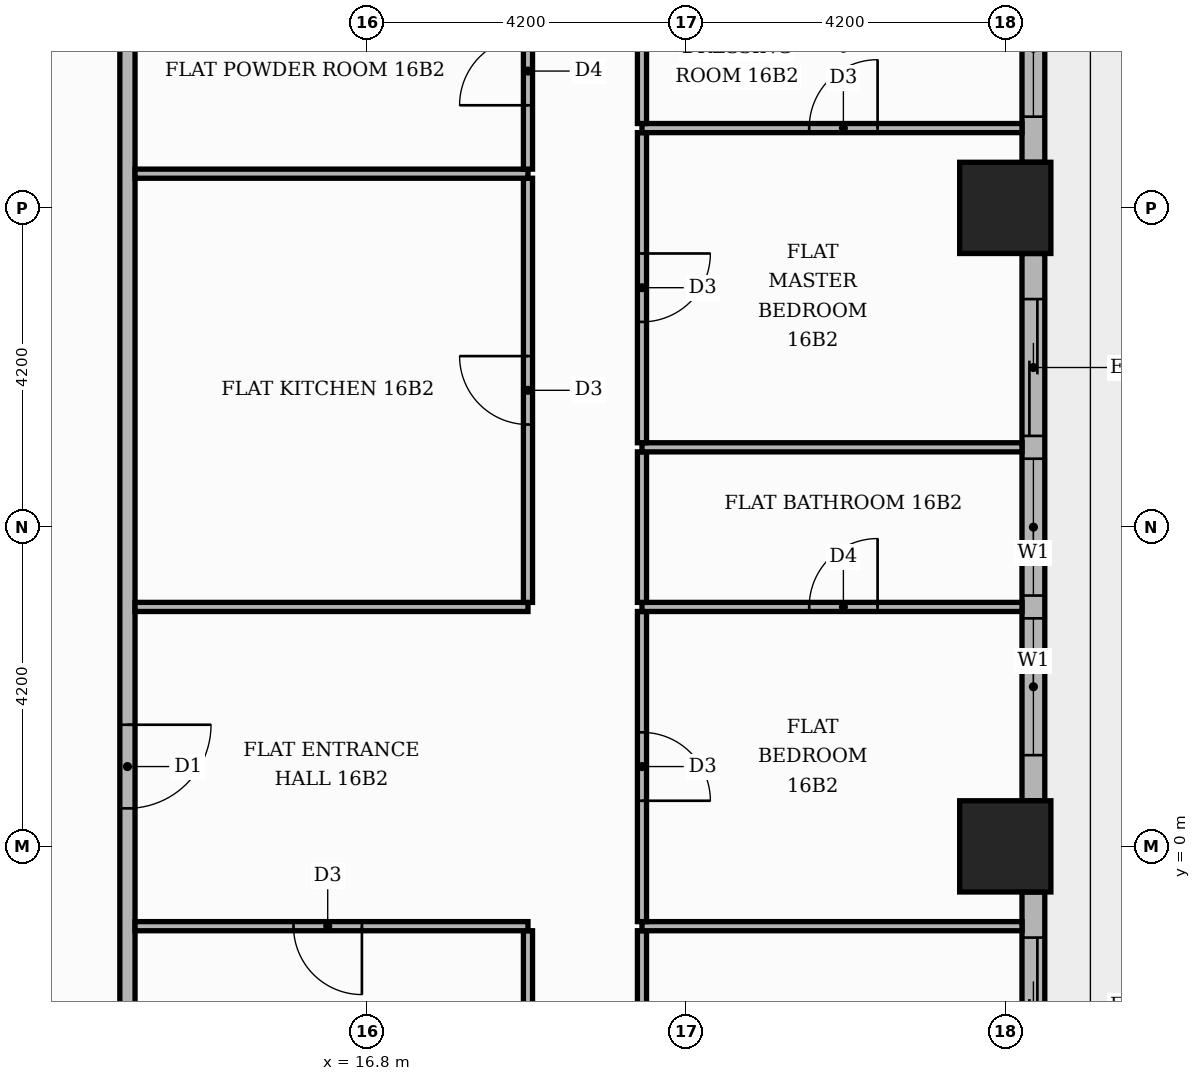
"""IFC4 building model, lengths in metres.
Left out: names, types, materials, properties, quantities, classifications, styles, units other than length and angle.
Written with IfcOpenShell. Run it as: python <this file> out.ifc"""

import sys

from ifc_helpers import new_model, si_unit, direction, frame, frame_2d, origin, origin_2d, place, context, subcontext, project, spatial, rectangle, extrude, element, fill, save


model = new_model("IFC4")
c1 = context("Model", 3, precision=1e-05, world=origin(), true_north=direction((0.0, 1.0)))
c2 = subcontext(c1, "Body", "Model", "MODEL_VIEW")
j1 = project(units=[si_unit("LENGTHUNIT", "METRE"), si_unit("PLANEANGLEUNIT", "RADIAN")], contexts=[c1])
p1 = place(None, origin())
s1 = spatial("IfcSite", under=j1, at=p1, CompositionType="ELEMENT")
p2 = place(p1, origin())
s2 = spatial("IfcBuilding", under=s1, at=p2, CompositionType="ELEMENT")
p3 = place(p2, frame((0.0, 0.0, 69.9)))
s3 = spatial("IfcBuildingStorey", under=s2, at=p3, CompositionType="ELEMENT", Elevation=69.9)
for number, where, z_axis, x_axis in (
    (1, (25.2, 0.0, 0.0), (0.0, 0.0, 1.0), (1.0, 0.0, 0.0)),
    (2, (25.2, 8.4, 0.0), (0.0, 0.0, 1.0), (1.0, 0.0, 0.0)),
):
    element("IfcColumn", number, at=place(p3, frame(where, z_axis=z_axis, x_axis=x_axis)), inside=s3, PredefinedType="COLUMN", context=c2, shape_type="SweptSolid", body=[
        extrude(rectangle(XDim=1.2, YDim=1.2, at=origin_2d()), origin(), (0.0, 0.0, 1.0), 3.9),
    ])
p4 = place(p3, frame((25.57, -7.8, 0.0), z_axis=(0.0, 0.0, 1.0), x_axis=(0.0, 1.0, 0.0)))
e3 = element("IfcWall", 3, at=p4, inside=s3, PredefinedType="STANDARD", context=c2, shape_type="SweptSolid", body=[
    extrude(rectangle(XDim=7.2, YDim=0.3, at=frame_2d((3.6, 0.0))), origin(), (0.0, 0.0, 1.0), 3.4),
])
p5 = place(p4, frame((0.6, 0.0, 0.9)))
e4 = element("IfcOpeningElement", 4, at=p5, cuts=e3, PredefinedType="OPENING", context=c2, shape_type="SweptSolid", body=[
    extrude(rectangle(XDim=1.8, YDim=2.1, at=frame_2d((0.9, 1.05))), frame((0.0, 0.16, 0.0), z_axis=(0.0, -1.0, 0.0), x_axis=(1.0, 0.0, 0.0)), (0.0, 0.0, 1.0), 0.32),
])
p6 = place(p4, frame((2.7, 0.0, 0.9)))
e5 = element("IfcOpeningElement", 5, at=p6, cuts=e3, PredefinedType="OPENING", context=c2, shape_type="SweptSolid", body=[
    extrude(rectangle(XDim=1.8, YDim=2.1, at=frame_2d((0.9, 1.05))), frame((0.0, 0.16, 0.0), z_axis=(0.0, -1.0, 0.0), x_axis=(1.0, 0.0, 0.0)), (0.0, 0.0, 1.0), 0.32),
])
p7 = place(p4, frame((4.8, 0.0, 0.0)))
e6 = element("IfcOpeningElement", 6, at=p7, cuts=e3, PredefinedType="OPENING", context=c2, shape_type="SweptSolid", body=[
    extrude(rectangle(XDim=1.8, YDim=2.4, at=frame_2d((0.9, 1.2))), frame((0.0, 0.16, 0.0), z_axis=(0.0, -1.0, 0.0), x_axis=(1.0, 0.0, 0.0)), (0.0, 0.0, 1.0), 0.32),
])
p8 = place(p3, frame((25.57, 0.6, 0.0), z_axis=(0.0, 0.0, 1.0), x_axis=(0.0, 1.0, 0.0)))
e7 = element("IfcWall", 7, at=p8, inside=s3, PredefinedType="STANDARD", context=c2, shape_type="SweptSolid", body=[
    extrude(rectangle(XDim=7.2, YDim=0.3, at=frame_2d((3.6, 0.0))), origin(), (0.0, 0.0, 1.0), 3.4),
])
p9 = place(p8, frame((0.6, 0.0, 0.9)))
e8 = element("IfcOpeningElement", 8, at=p9, cuts=e7, PredefinedType="OPENING", context=c2, shape_type="SweptSolid", body=[
    extrude(rectangle(XDim=1.8, YDim=2.1, at=frame_2d((0.9, 1.05))), frame((0.0, 0.16, 0.0), z_axis=(0.0, -1.0, 0.0), x_axis=(1.0, 0.0, 0.0)), (0.0, 0.0, 1.0), 0.32),
])
p10 = place(p8, frame((2.7, 0.0, 0.9)))
e9 = element("IfcOpeningElement", 9, at=p10, cuts=e7, PredefinedType="OPENING", context=c2, shape_type="SweptSolid", body=[
    extrude(rectangle(XDim=1.8, YDim=2.1, at=frame_2d((0.9, 1.05))), frame((0.0, 0.16, 0.0), z_axis=(0.0, -1.0, 0.0), x_axis=(1.0, 0.0, 0.0)), (0.0, 0.0, 1.0), 0.32),
])
p11 = place(p8, frame((4.8, 0.0, 0.0)))
e10 = element("IfcOpeningElement", 10, at=p11, cuts=e7, PredefinedType="OPENING", context=c2, shape_type="SweptSolid", body=[
    extrude(rectangle(XDim=1.8, YDim=2.4, at=frame_2d((0.9, 1.2))), frame((0.0, 0.16, 0.0), z_axis=(0.0, -1.0, 0.0), x_axis=(1.0, 0.0, 0.0)), (0.0, 0.0, 1.0), 0.32),
])
p12 = place(p3, frame((25.57, 9.0, 0.0), z_axis=(0.0, 0.0, 1.0), x_axis=(0.0, 1.0, 0.0)))
e11 = element("IfcWall", 11, at=p12, inside=s3, PredefinedType="STANDARD", context=c2, shape_type="SweptSolid", body=[
    extrude(rectangle(XDim=7.2, YDim=0.3, at=frame_2d((3.6, 0.0))), origin(), (0.0, 0.0, 1.0), 3.4),
])
p13 = place(p12, frame((0.6, 0.0, 0.9)))
e12 = element("IfcOpeningElement", 12, at=p13, cuts=e11, PredefinedType="OPENING", context=c2, shape_type="SweptSolid", body=[
    extrude(rectangle(XDim=1.8, YDim=2.1, at=frame_2d((0.9, 1.05))), frame((0.0, 0.16, 0.0), z_axis=(0.0, -1.0, 0.0), x_axis=(1.0, 0.0, 0.0)), (0.0, 0.0, 1.0), 0.32),
])
p14 = place(p12, frame((2.7, 0.0, 0.9)))
e13 = element("IfcOpeningElement", 13, at=p14, cuts=e11, PredefinedType="OPENING", context=c2, shape_type="SweptSolid", body=[
    extrude(rectangle(XDim=1.8, YDim=2.1, at=frame_2d((0.9, 1.05))), frame((0.0, 0.16, 0.0), z_axis=(0.0, -1.0, 0.0), x_axis=(1.0, 0.0, 0.0)), (0.0, 0.0, 1.0), 0.32),
])
p15 = place(p12, frame((4.8, 0.0, 0.9)))
e14 = element("IfcOpeningElement", 14, at=p15, cuts=e11, PredefinedType="OPENING", context=c2, shape_type="SweptSolid", body=[
    extrude(rectangle(XDim=1.8, YDim=2.1, at=frame_2d((0.9, 1.05))), frame((0.0, 0.16, 0.0), z_axis=(0.0, -1.0, 0.0), x_axis=(1.0, 0.0, 0.0)), (0.0, 0.0, 1.0), 0.32),
])
p16 = place(p3, frame((13.65, -5.15, 0.0), z_axis=(0.0, 0.0, 1.0), x_axis=(0.0, 1.0, 0.0)))
e15 = element("IfcWall", 15, at=p16, inside=s3, PredefinedType="PARTITIONING", context=c2, shape_type="SweptSolid", body=[
    extrude(rectangle(XDim=18.7, YDim=0.2, at=frame_2d((9.35, 0.0))), origin(), (0.0, 0.0, 1.0), 3.4),
])
p17 = place(p16, frame((5.65, 0.0, 0.0)))
e16 = element("IfcOpeningElement", 16, at=p17, cuts=e15, PredefinedType="OPENING", context=c2, shape_type="SweptSolid", body=[
    extrude(rectangle(XDim=1.1, YDim=2.4, at=frame_2d((0.55, 1.2))), frame((0.0, 0.11, 0.0), z_axis=(0.0, -1.0, 0.0), x_axis=(1.0, 0.0, 0.0)), (0.0, 0.0, 1.0), 0.22),
])
p18 = place(p3, frame((18.92, -5.15, 0.0), z_axis=(0.0, 0.0, 1.0), x_axis=(0.0, 1.0, 0.0)))
e17 = element("IfcWall", 17, at=p18, inside=s3, PredefinedType="PARTITIONING", context=c2, shape_type="SweptSolid", body=[
    extrude(rectangle(XDim=4.04, YDim=0.12, at=frame_2d((2.02, 0.0))), origin(), (0.0, 0.0, 1.0), 3.4),
])
p19 = place(p3, frame((20.42, -5.15, 0.0), z_axis=(0.0, 0.0, 1.0), x_axis=(0.0, 1.0, 0.0)))
e18 = element("IfcWall", 18, at=p19, inside=s3, PredefinedType="PARTITIONING", context=c2, shape_type="SweptSolid", body=[
    extrude(rectangle(XDim=4.04, YDim=0.12, at=frame_2d((2.02, 0.0))), origin(), (0.0, 0.0, 1.0), 3.4),
])
p20 = place(p19, frame((1.5, 0.0, 0.0)))
e19 = element("IfcOpeningElement", 19, at=p20, cuts=e18, PredefinedType="OPENING", context=c2, shape_type="SweptSolid", body=[
    extrude(rectangle(XDim=1.0, YDim=2.1, at=frame_2d((0.5, 1.05))), frame((0.0, 0.07, 0.0), z_axis=(0.0, -1.0, 0.0), x_axis=(1.0, 0.0, 0.0)), (0.0, 0.0, 1.0), 0.14),
])
p21 = place(p3, frame((13.75, -1.05, 0.0), z_axis=(0.0, 0.0, 1.0), x_axis=(1.0, 0.0, 0.0)))
e20 = element("IfcWall", 20, at=p21, inside=s3, PredefinedType="PARTITIONING", context=c2, shape_type="SweptSolid", body=[
    extrude(rectangle(XDim=5.17, YDim=0.12, at=frame_2d((2.585, 0.0))), origin(), (0.0, 0.0, 1.0), 3.4),
])
p22 = place(p21, frame((2.085, 0.0, 0.0)))
e21 = element("IfcOpeningElement", 21, at=p22, cuts=e20, PredefinedType="OPENING", context=c2, shape_type="SweptSolid", body=[
    extrude(rectangle(XDim=0.9, YDim=2.1, at=frame_2d((0.45, 1.05))), frame((0.0, 0.07, 0.0), z_axis=(0.0, -1.0, 0.0), x_axis=(1.0, 0.0, 0.0)), (0.0, 0.0, 1.0), 0.14),
])
p23 = place(p3, frame((20.42, -1.05, 0.0), z_axis=(0.0, 0.0, 1.0), x_axis=(1.0, 0.0, 0.0)))
e22 = element("IfcWall", 22, at=p23, inside=s3, PredefinedType="PARTITIONING", context=c2, shape_type="SweptSolid", body=[
    extrude(rectangle(XDim=5.0, YDim=0.12, at=frame_2d((2.5, 0.0))), origin(), (0.0, 0.0, 1.0), 3.4),
])
p24 = place(p3, frame((20.42, -0.99, 0.0), z_axis=(0.0, 0.0, 1.0), x_axis=(0.0, 1.0, 0.0)))
e23 = element("IfcWall", 23, at=p24, inside=s3, PredefinedType="PARTITIONING", context=c2, shape_type="SweptSolid", body=[
    extrude(rectangle(XDim=4.08, YDim=0.12, at=frame_2d((2.04, 0.0))), origin(), (0.0, 0.0, 1.0), 3.4),
])
p25 = place(p24, frame((1.59, 0.0, 0.0)))
e24 = element("IfcOpeningElement", 24, at=p25, cuts=e23, PredefinedType="OPENING", context=c2, shape_type="SweptSolid", body=[
    extrude(rectangle(XDim=0.9, YDim=2.1, at=frame_2d((0.45, 1.05))), frame((0.0, 0.07, 0.0), z_axis=(0.0, -1.0, 0.0), x_axis=(1.0, 0.0, 0.0)), (0.0, 0.0, 1.0), 0.14),
])
p26 = place(p3, frame((13.75, 3.15, 0.0), z_axis=(0.0, 0.0, 1.0), x_axis=(1.0, 0.0, 0.0)))
e25 = element("IfcWall", 25, at=p26, inside=s3, PredefinedType="PARTITIONING", context=c2, shape_type="SweptSolid", body=[
    extrude(rectangle(XDim=5.17, YDim=0.12, at=frame_2d((2.585, 0.0))), origin(), (0.0, 0.0, 1.0), 3.4),
])
p27 = place(p3, frame((20.42, 3.15, 0.0), z_axis=(0.0, 0.0, 1.0), x_axis=(1.0, 0.0, 0.0)))
e26 = element("IfcWall", 26, at=p27, inside=s3, PredefinedType="PARTITIONING", context=c2, shape_type="SweptSolid", body=[
    extrude(rectangle(XDim=5.0, YDim=0.12, at=frame_2d((2.5, 0.0))), origin(), (0.0, 0.0, 1.0), 3.4),
])
p28 = place(p27, frame((2.2, 0.0, 0.0)))
e27 = element("IfcOpeningElement", 27, at=p28, cuts=e26, PredefinedType="OPENING", context=c2, shape_type="SweptSolid", body=[
    extrude(rectangle(XDim=0.9, YDim=2.1, at=frame_2d((0.45, 1.05))), frame((0.0, 0.07, 0.0), z_axis=(0.0, -1.0, 0.0), x_axis=(1.0, 0.0, 0.0)), (0.0, 0.0, 1.0), 0.14),
])
p29 = place(p3, frame((18.92, 3.21, 0.0), z_axis=(0.0, 0.0, 1.0), x_axis=(0.0, 1.0, 0.0)))
e28 = element("IfcWall", 28, at=p29, inside=s3, PredefinedType="PARTITIONING", context=c2, shape_type="SweptSolid", body=[
    extrude(rectangle(XDim=5.58, YDim=0.12, at=frame_2d((2.79, 0.0))), origin(), (0.0, 0.0, 1.0), 3.4),
])
p30 = place(p29, frame((2.34, 0.0, 0.0)))
e29 = element("IfcOpeningElement", 29, at=p30, cuts=e28, PredefinedType="OPENING", context=c2, shape_type="SweptSolid", body=[
    extrude(rectangle(XDim=0.9, YDim=2.1, at=frame_2d((0.45, 1.05))), frame((0.0, 0.07, 0.0), z_axis=(0.0, -1.0, 0.0), x_axis=(1.0, 0.0, 0.0)), (0.0, 0.0, 1.0), 0.14),
])
p31 = place(p3, frame((20.42, 3.21, 0.0), z_axis=(0.0, 0.0, 1.0), x_axis=(0.0, 1.0, 0.0)))
e30 = element("IfcWall", 30, at=p31, inside=s3, PredefinedType="PARTITIONING", context=c2, shape_type="SweptSolid", body=[
    extrude(rectangle(XDim=1.98, YDim=0.12, at=frame_2d((0.99, 0.0))), origin(), (0.0, 0.0, 1.0), 3.4),
])
p32 = place(p3, frame((20.42, 5.25, 0.0), z_axis=(0.0, 0.0, 1.0), x_axis=(1.0, 0.0, 0.0)))
e31 = element("IfcWall", 31, at=p32, inside=s3, PredefinedType="PARTITIONING", context=c2, shape_type="SweptSolid", body=[
    extrude(rectangle(XDim=5.0, YDim=0.12, at=frame_2d((2.5, 0.0))), origin(), (0.0, 0.0, 1.0), 3.4),
])
p33 = place(p3, frame((20.42, 5.31, 0.0), z_axis=(0.0, 0.0, 1.0), x_axis=(0.0, 1.0, 0.0)))
e32 = element("IfcWall", 32, at=p33, inside=s3, PredefinedType="PARTITIONING", context=c2, shape_type="SweptSolid", body=[
    extrude(rectangle(XDim=4.08, YDim=0.12, at=frame_2d((2.04, 0.0))), origin(), (0.0, 0.0, 1.0), 3.4),
])
p34 = place(p33, frame((1.59, 0.0, 0.0)))
e33 = element("IfcOpeningElement", 33, at=p34, cuts=e32, PredefinedType="OPENING", context=c2, shape_type="SweptSolid", body=[
    extrude(rectangle(XDim=0.9, YDim=2.1, at=frame_2d((0.45, 1.05))), frame((0.0, 0.07, 0.0), z_axis=(0.0, -1.0, 0.0), x_axis=(1.0, 0.0, 0.0)), (0.0, 0.0, 1.0), 0.14),
])
p35 = place(p3, frame((13.75, 8.85, 0.0), z_axis=(0.0, 0.0, 1.0), x_axis=(1.0, 0.0, 0.0)))
e34 = element("IfcWall", 34, at=p35, inside=s3, PredefinedType="PARTITIONING", context=c2, shape_type="SweptSolid", body=[
    extrude(rectangle(XDim=5.17, YDim=0.12, at=frame_2d((2.585, 0.0))), origin(), (0.0, 0.0, 1.0), 3.4),
])
p36 = place(p3, frame((18.92, 8.91, 0.0), z_axis=(0.0, 0.0, 1.0), x_axis=(0.0, 1.0, 0.0)))
e35 = element("IfcWall", 35, at=p36, inside=s3, PredefinedType="PARTITIONING", context=c2, shape_type="SweptSolid", body=[
    extrude(rectangle(XDim=2.58, YDim=0.12, at=frame_2d((1.29, 0.0))), origin(), (0.0, 0.0, 1.0), 3.4),
])
p37 = place(p36, frame((0.84, 0.0, 0.0)))
e36 = element("IfcOpeningElement", 36, at=p37, cuts=e35, PredefinedType="OPENING", context=c2, shape_type="SweptSolid", body=[
    extrude(rectangle(XDim=0.9, YDim=2.1, at=frame_2d((0.45, 1.05))), frame((0.0, 0.07, 0.0), z_axis=(0.0, -1.0, 0.0), x_axis=(1.0, 0.0, 0.0)), (0.0, 0.0, 1.0), 0.14),
])
p38 = place(p3, frame((20.42, 9.45, 0.0), z_axis=(0.0, 0.0, 1.0), x_axis=(1.0, 0.0, 0.0)))
e37 = element("IfcWall", 37, at=p38, inside=s3, PredefinedType="PARTITIONING", context=c2, shape_type="SweptSolid", body=[
    extrude(rectangle(XDim=5.0, YDim=0.12, at=frame_2d((2.5, 0.0))), origin(), (0.0, 0.0, 1.0), 3.4),
])
p39 = place(p38, frame((2.2, 0.0, 0.0)))
e38 = element("IfcOpeningElement", 38, at=p39, cuts=e37, PredefinedType="OPENING", context=c2, shape_type="SweptSolid", body=[
    extrude(rectangle(XDim=0.9, YDim=2.1, at=frame_2d((0.45, 1.05))), frame((0.0, 0.07, 0.0), z_axis=(0.0, -1.0, 0.0), x_axis=(1.0, 0.0, 0.0)), (0.0, 0.0, 1.0), 0.14),
])
p40 = place(p3, frame((20.42, 9.51, 0.0), z_axis=(0.0, 0.0, 1.0), x_axis=(0.0, 1.0, 0.0)))
e39 = element("IfcWall", 39, at=p40, inside=s3, PredefinedType="PARTITIONING", context=c2, shape_type="SweptSolid", body=[
    extrude(rectangle(XDim=1.98, YDim=0.12, at=frame_2d((0.99, 0.0))), origin(), (0.0, 0.0, 1.0), 3.4),
])
p41 = place(p7, origin())
e40 = element("IfcDoor", 40, at=p41, inside=s3, OperationType="SLIDING_TO_RIGHT", PredefinedType="DOOR", context=c2, shape_type="SweptSolid", body=[
    extrude(rectangle(XDim=1.8, YDim=2.4, at=frame_2d((0.9, 1.2))), frame((0.0, 0.025, 0.0), z_axis=(0.0, -1.0, 0.0), x_axis=(1.0, 0.0, 0.0)), (0.0, 0.0, 1.0), 0.05),
])
fill(e6, e40)
p42 = place(p9, origin())
e41 = element("IfcWindow", 41, at=p42, inside=s3, PartitioningType="SINGLE_PANEL", PredefinedType="WINDOW", context=c2, shape_type="SweptSolid", body=[
    extrude(rectangle(XDim=1.8, YDim=2.1, at=frame_2d((0.9, 1.05))), frame((0.0, 0.03, 0.0), z_axis=(0.0, -1.0, 0.0), x_axis=(1.0, 0.0, 0.0)), (0.0, 0.0, 1.0), 0.06),
])
fill(e8, e41)
p43 = place(p10, origin())
e42 = element("IfcWindow", 42, at=p43, inside=s3, PartitioningType="SINGLE_PANEL", PredefinedType="WINDOW", context=c2, shape_type="SweptSolid", body=[
    extrude(rectangle(XDim=1.8, YDim=2.1, at=frame_2d((0.9, 1.05))), frame((0.0, 0.03, 0.0), z_axis=(0.0, -1.0, 0.0), x_axis=(1.0, 0.0, 0.0)), (0.0, 0.0, 1.0), 0.06),
])
fill(e9, e42)
p44 = place(p11, origin())
e43 = element("IfcDoor", 43, at=p44, inside=s3, OperationType="SLIDING_TO_RIGHT", PredefinedType="DOOR", context=c2, shape_type="SweptSolid", body=[
    extrude(rectangle(XDim=1.8, YDim=2.4, at=frame_2d((0.9, 1.2))), frame((0.0, 0.025, 0.0), z_axis=(0.0, -1.0, 0.0), x_axis=(1.0, 0.0, 0.0)), (0.0, 0.0, 1.0), 0.05),
])
fill(e10, e43)
p45 = place(p13, origin())
e44 = element("IfcWindow", 44, at=p45, inside=s3, PartitioningType="SINGLE_PANEL", PredefinedType="WINDOW", context=c2, shape_type="SweptSolid", body=[
    extrude(rectangle(XDim=1.8, YDim=2.1, at=frame_2d((0.9, 1.05))), frame((0.0, 0.03, 0.0), z_axis=(0.0, -1.0, 0.0), x_axis=(1.0, 0.0, 0.0)), (0.0, 0.0, 1.0), 0.06),
])
fill(e12, e44)
p46 = place(p17, frame((1.1, 0.0, 0.0), z_axis=(0.0, 0.0, 1.0), x_axis=(-1.0, 0.0, 0.0)))
e45 = element("IfcDoor", 45, at=p46, inside=s3, OperationType="SINGLE_SWING_RIGHT", PredefinedType="DOOR", context=c2, shape_type="SweptSolid", body=[
    extrude(rectangle(XDim=1.1, YDim=2.4, at=frame_2d((0.55, 1.2))), frame((0.0, 0.025, 0.0), z_axis=(0.0, -1.0, 0.0), x_axis=(1.0, 0.0, 0.0)), (0.0, 0.0, 1.0), 0.05),
])
fill(e16, e45)
p47 = place(p22, frame((0.9, 0.0, 0.0), z_axis=(0.0, 0.0, 1.0), x_axis=(-1.0, 0.0, 0.0)))
e46 = element("IfcDoor", 46, at=p47, inside=s3, OperationType="SINGLE_SWING_RIGHT", PredefinedType="DOOR", context=c2, shape_type="SweptSolid", body=[
    extrude(rectangle(XDim=0.9, YDim=2.1, at=frame_2d((0.45, 1.05))), frame((0.0, 0.025, 0.0), z_axis=(0.0, -1.0, 0.0), x_axis=(1.0, 0.0, 0.0)), (0.0, 0.0, 1.0), 0.05),
])
fill(e21, e46)
p48 = place(p30, origin())
e47 = element("IfcDoor", 47, at=p48, inside=s3, OperationType="SINGLE_SWING_RIGHT", PredefinedType="DOOR", context=c2, shape_type="SweptSolid", body=[
    extrude(rectangle(XDim=0.9, YDim=2.1, at=frame_2d((0.45, 1.05))), frame((0.0, 0.025, 0.0), z_axis=(0.0, -1.0, 0.0), x_axis=(1.0, 0.0, 0.0)), (0.0, 0.0, 1.0), 0.05),
])
fill(e29, e47)
p49 = place(p37, origin())
e48 = element("IfcDoor", 48, at=p49, inside=s3, OperationType="SINGLE_SWING_LEFT", PredefinedType="DOOR", context=c2, shape_type="SweptSolid", body=[
    extrude(rectangle(XDim=0.9, YDim=2.1, at=frame_2d((0.45, 1.05))), frame((0.0, 0.025, 0.0), z_axis=(0.0, -1.0, 0.0), x_axis=(1.0, 0.0, 0.0)), (0.0, 0.0, 1.0), 0.05),
])
fill(e36, e48)
p50 = place(p25, frame((0.9, 0.0, 0.0), z_axis=(0.0, 0.0, 1.0), x_axis=(-1.0, 0.0, 0.0)))
e49 = element("IfcDoor", 49, at=p50, inside=s3, OperationType="SINGLE_SWING_LEFT", PredefinedType="DOOR", context=c2, shape_type="SweptSolid", body=[
    extrude(rectangle(XDim=0.9, YDim=2.1, at=frame_2d((0.45, 1.05))), frame((0.0, 0.025, 0.0), z_axis=(0.0, -1.0, 0.0), x_axis=(1.0, 0.0, 0.0)), (0.0, 0.0, 1.0), 0.05),
])
fill(e24, e49)
p51 = place(p28, origin())
e50 = element("IfcDoor", 50, at=p51, inside=s3, OperationType="SINGLE_SWING_RIGHT", PredefinedType="DOOR", context=c2, shape_type="SweptSolid", body=[
    extrude(rectangle(XDim=0.9, YDim=2.1, at=frame_2d((0.45, 1.05))), frame((0.0, 0.025, 0.0), z_axis=(0.0, -1.0, 0.0), x_axis=(1.0, 0.0, 0.0)), (0.0, 0.0, 1.0), 0.05),
])
fill(e27, e50)
p52 = place(p34, frame((0.9, 0.0, 0.0), z_axis=(0.0, 0.0, 1.0), x_axis=(-1.0, 0.0, 0.0)))
e51 = element("IfcDoor", 51, at=p52, inside=s3, OperationType="SINGLE_SWING_RIGHT", PredefinedType="DOOR", context=c2, shape_type="SweptSolid", body=[
    extrude(rectangle(XDim=0.9, YDim=2.1, at=frame_2d((0.45, 1.05))), frame((0.0, 0.025, 0.0), z_axis=(0.0, -1.0, 0.0), x_axis=(1.0, 0.0, 0.0)), (0.0, 0.0, 1.0), 0.05),
])
fill(e33, e51)
p53 = place(p39, origin())
e52 = element("IfcDoor", 52, at=p53, inside=s3, OperationType="SINGLE_SWING_RIGHT", PredefinedType="DOOR", context=c2, shape_type="SweptSolid", body=[
    extrude(rectangle(XDim=0.9, YDim=2.1, at=frame_2d((0.45, 1.05))), frame((0.0, 0.025, 0.0), z_axis=(0.0, -1.0, 0.0), x_axis=(1.0, 0.0, 0.0)), (0.0, 0.0, 1.0), 0.05),
])
fill(e38, e52)
save(model, sys.argv[1])
